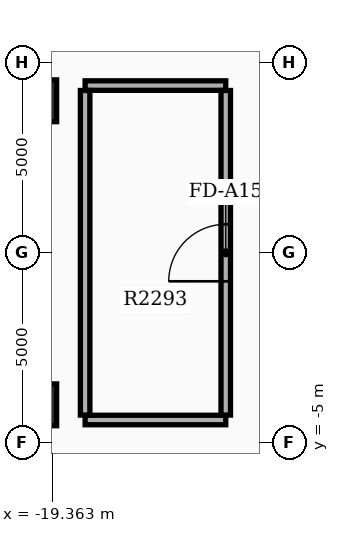
"""IFC4 building model, lengths in metres.
Left out: names, types, materials, properties, quantities, classifications, styles, units other than length and angle.
Written with IfcOpenShell. Run it as: python <this file> out.ifc"""

import sys

from ifc_helpers import new_model, si_unit, direction, frame, frame_2d, origin, origin_2d, place, context, subcontext, project, spatial, rectangle, extrude, element, fill, save


model = new_model("IFC4")
c1 = context("Model", 3, precision=1e-05, world=origin(), true_north=direction((0.0, 1.0)))
c2 = subcontext(c1, "Body", "Model", "MODEL_VIEW")
j1 = project(units=[si_unit("LENGTHUNIT", "METRE"), si_unit("PLANEANGLEUNIT", "RADIAN")], contexts=[c1])
p1 = place(None, origin())
s1 = spatial("IfcSite", under=j1, at=p1, CompositionType="ELEMENT")
p2 = place(p1, origin())
s2 = spatial("IfcBuilding", under=s1, at=p2, CompositionType="ELEMENT")
p3 = place(p2, frame((0.0, 0.0, 143.7)))
s3 = spatial("IfcBuildingStorey", under=s2, at=p3, CompositionType="ELEMENT", Elevation=143.7)
for number, where, z_axis, x_axis in (
    (1, (-19.8, -4.0, 0.0), (0.0, 0.0, 1.0), (1.0, 0.0, 0.0)),
    (2, (-19.8, 4.0, 0.0), (0.0, 0.0, 1.0), (1.0, 0.0, 0.0)),
):
    element("IfcColumn", number, at=place(p3, frame(where, z_axis=z_axis, x_axis=x_axis)), inside=s3, PredefinedType="COLUMN", context=c2, shape_type="SweptSolid", body=[
        extrude(rectangle(XDim=1.1, YDim=1.1, at=origin_2d()), origin(), (0.0, 0.0, 1.0), 5.1),
    ])
for number, where, z_axis, x_axis in (
    (3, (-18.5, -4.4, 0.0), (0.0, 0.0, 1.0), (1.0, 0.0, 0.0)),
    (4, (-18.5, 4.4, 0.0), (0.0, 0.0, 1.0), (1.0, 0.0, 0.0)),
):
    element("IfcWall", number, at=place(p3, frame(where, z_axis=z_axis, x_axis=x_axis)), inside=s3, PredefinedType="SOLIDWALL", context=c2, shape_type="SweptSolid", body=[
        extrude(rectangle(XDim=3.7, YDim=0.25, at=frame_2d((1.85, 0.0))), origin(), (0.0, 0.0, 1.0), 3.97),
    ])
p4 = place(p3, frame((-18.5, -4.27, 0.0), z_axis=(0.0, 0.0, 1.0), x_axis=(0.0, 1.0, 0.0)))
e5 = element("IfcWall", 5, at=p4, inside=s3, PredefinedType="SOLIDWALL", context=c2, shape_type="SweptSolid", body=[
    extrude(rectangle(XDim=8.54, YDim=0.25, at=frame_2d((4.27, 0.0))), origin(), (0.0, 0.0, 1.0), 3.97),
])
p5 = place(p3, frame((-14.8, -4.27, 0.0), z_axis=(0.0, 0.0, 1.0), x_axis=(0.0, 1.0, 0.0)))
e6 = element("IfcWall", 6, at=p5, inside=s3, PredefinedType="SOLIDWALL", context=c2, shape_type="SweptSolid", body=[
    extrude(rectangle(XDim=8.54, YDim=0.25, at=frame_2d((4.27, 0.0))), origin(), (0.0, 0.0, 1.0), 3.97),
])
p6 = place(p5, frame((3.52, 0.0, 0.0)))
e7 = element("IfcOpeningElement", 7, at=p6, cuts=e6, PredefinedType="OPENING", context=c2, shape_type="SweptSolid", body=[
    extrude(rectangle(XDim=1.5, YDim=2.15, at=frame_2d((0.75, 1.075))), frame((0.0, 0.135, 0.0), z_axis=(0.0, -1.0, 0.0), x_axis=(1.0, 0.0, 0.0)), (0.0, 0.0, 1.0), 0.27),
])
p7 = place(p6, origin())
e8 = element("IfcDoor", 8, at=p7, inside=s3, OperationType="DOUBLE_DOOR_SINGLE_SWING", PredefinedType="DOOR", context=c2, shape_type="SweptSolid", body=[
    extrude(rectangle(XDim=1.5, YDim=2.15, at=frame_2d((0.75, 1.075))), frame((0.0, 0.025, 0.0), z_axis=(0.0, -1.0, 0.0), x_axis=(1.0, 0.0, 0.0)), (0.0, 0.0, 1.0), 0.05),
])
fill(e7, e8)
save(model, sys.argv[1])
